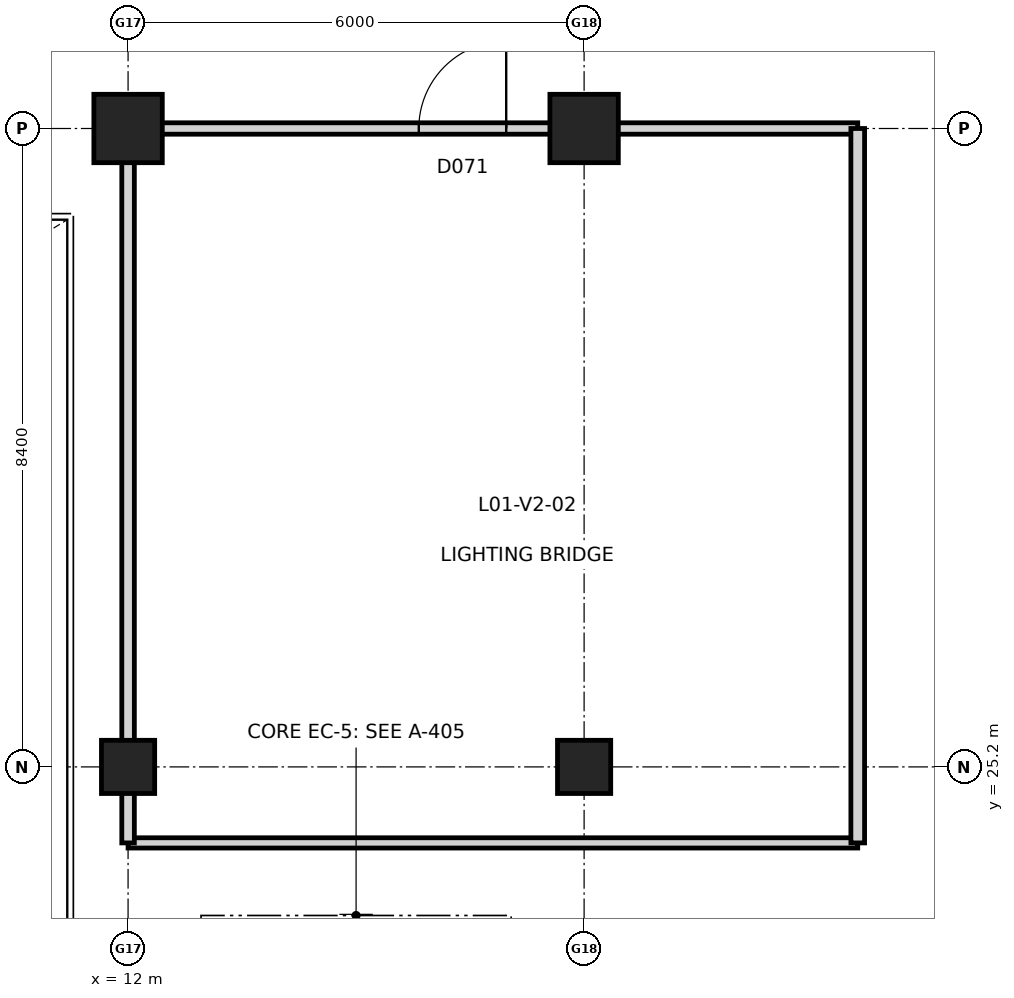
"""IFC4 building model, lengths in metres.
Left out: names, types, materials, properties, quantities, classifications, styles, units other than length and angle.
Written with IfcOpenShell. Run it as: python <this file> out.ifc"""

import sys

from ifc_helpers import new_model, si_unit, direction, frame, frame_2d, origin, origin_2d, place, context, subcontext, project, spatial, rectangle, extrude, element, fill, save


model = new_model("IFC4")
c1 = context("Model", 3, precision=1e-05, world=origin(), true_north=direction((0.0, 1.0)))
c2 = subcontext(c1, "Body", "Model", "MODEL_VIEW")
j1 = project(units=[si_unit("LENGTHUNIT", "METRE"), si_unit("PLANEANGLEUNIT", "RADIAN")], contexts=[c1])
p1 = place(None, origin())
s1 = spatial("IfcSite", under=j1, at=p1, CompositionType="ELEMENT")
p2 = place(p1, origin())
s2 = spatial("IfcBuilding", under=s1, at=p2, CompositionType="ELEMENT")
p3 = place(p2, frame((0.0, 0.0, 5.4)))
s3 = spatial("IfcBuildingStorey", under=s2, at=p3, CompositionType="ELEMENT", Elevation=5.4)
p4 = place(p3, frame((12.0, 25.2, 0.0), z_axis=(0.0, 0.0, 1.0), x_axis=(1.0, 0.0, 0.0)))
e1 = element("IfcColumn", 1, at=p4, inside=s3, PredefinedType="COLUMN", context=c2, shape_type="SweptSolid", body=[
    extrude(rectangle(XDim=0.7, YDim=0.7, at=origin_2d()), origin(), (0.0, 0.0, 1.0), 4.8),
])
p5 = place(p3, frame((12.0, 33.6, 0.0), z_axis=(0.0, 0.0, 1.0), x_axis=(1.0, 0.0, 0.0)))
e2 = element("IfcColumn", 2, at=p5, inside=s3, PredefinedType="COLUMN", context=c2, shape_type="SweptSolid", body=[
    extrude(rectangle(XDim=0.9, YDim=0.9, at=origin_2d()), origin(), (0.0, 0.0, 1.0), 4.8),
])
p6 = place(p3, frame((18.0, 25.2, 0.0), z_axis=(0.0, 0.0, 1.0), x_axis=(1.0, 0.0, 0.0)))
e3 = element("IfcColumn", 3, at=p6, inside=s3, PredefinedType="COLUMN", context=c2, shape_type="SweptSolid", body=[
    extrude(rectangle(XDim=0.7, YDim=0.7, at=origin_2d()), origin(), (0.0, 0.0, 1.0), 4.8),
])
p7 = place(p3, frame((18.0, 33.6, 0.0), z_axis=(0.0, 0.0, 1.0), x_axis=(1.0, 0.0, 0.0)))
e4 = element("IfcColumn", 4, at=p7, inside=s3, PredefinedType="COLUMN", context=c2, shape_type="SweptSolid", body=[
    extrude(rectangle(XDim=0.9, YDim=0.9, at=origin_2d()), origin(), (0.0, 0.0, 1.0), 4.8),
])
p8 = place(p3, frame((12.0, 24.2, 0.0), z_axis=(0.0, 0.0, 1.0), x_axis=(1.0, 0.0, 0.0)))
e5 = element("IfcWall", 5, at=p8, inside=s3, PredefinedType="PARTITIONING", context=c2, shape_type="SweptSolid", body=[
    extrude(rectangle(XDim=9.6, YDim=0.135, at=frame_2d((4.8, 0.0))), origin(), (0.0, 0.0, 1.0), 4.42),
])
p9 = place(p3, frame((12.0, 33.6, 0.0), z_axis=(0.0, 0.0, 1.0), x_axis=(1.0, 0.0, 0.0)))
e6 = element("IfcWall", 6, at=p9, inside=s3, PredefinedType="PARTITIONING", context=c2, shape_type="SweptSolid", body=[
    extrude(rectangle(XDim=9.6, YDim=0.15, at=frame_2d((4.8, 0.0))), origin(), (0.0, 0.0, 1.0), 3.807),
])
p10 = place(p9, frame((3.825, 0.0, 0.0)))
e7 = element("IfcOpeningElement", 7, at=p10, cuts=e6, PredefinedType="OPENING", context=c2, shape_type="SweptSolid", body=[
    extrude(rectangle(XDim=1.15, YDim=2.3, at=frame_2d((0.575, 1.15))), frame((0.0, 0.085, 0.0), z_axis=(0.0, -1.0, 0.0), x_axis=(1.0, 0.0, 0.0)), (0.0, 0.0, 1.0), 0.17),
])
p11 = place(p3, frame((12.0, 24.2, 0.0), z_axis=(0.0, 0.0, 1.0), x_axis=(0.0, 1.0, 0.0)))
e8 = element("IfcWall", 8, at=p11, inside=s3, PredefinedType="PARTITIONING", context=c2, shape_type="SweptSolid", body=[
    extrude(rectangle(XDim=9.4, YDim=0.165, at=frame_2d((4.7, 0.0))), origin(), (0.0, 0.0, 1.0), 3.685),
])
p12 = place(p3, frame((21.6, 24.2, 0.0), z_axis=(0.0, 0.0, 1.0), x_axis=(0.0, 1.0, 0.0)))
e9 = element("IfcWall", 9, at=p12, inside=s3, PredefinedType="PARTITIONING", context=c2, shape_type="SweptSolid", body=[
    extrude(rectangle(XDim=9.4, YDim=0.18, at=frame_2d((4.7, 0.0))), origin(), (0.0, 0.0, 1.0), 4.42),
])
p13 = place(p10, origin())
e10 = element("IfcDoor", 10, at=p13, inside=s3, OperationType="SINGLE_SWING_RIGHT", PredefinedType="DOOR", context=c2, shape_type="SweptSolid", body=[
    extrude(rectangle(XDim=1.15, YDim=2.3, at=frame_2d((0.575, 1.15))), frame((0.0, 0.025, 0.0), z_axis=(0.0, -1.0, 0.0), x_axis=(1.0, 0.0, 0.0)), (0.0, 0.0, 1.0), 0.05),
])
fill(e7, e10)
save(model, sys.argv[1])
